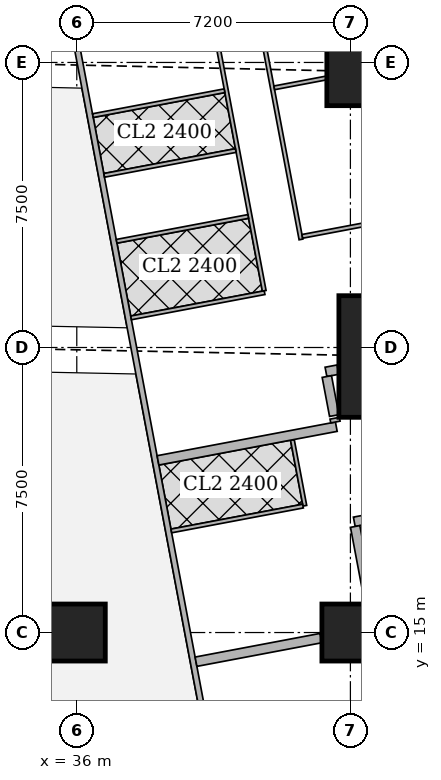
"""IFC4 building model, lengths in metres.
Left out: names, types, materials, properties, quantities, classifications, styles, units other than length and angle.
Written with IfcOpenShell. Run it as: python <this file> out.ifc"""

import sys

from ifc_helpers import new_model, si_unit, direction, frame, frame_2d, origin, origin_2d, place, context, subcontext, project, spatial, rectangle, extrude, element, fill, save


model = new_model("IFC4")
c1 = context("Model", 3, precision=1e-05, world=origin(), true_north=direction((0.0, 1.0)))
c2 = subcontext(c1, "Body", "Model", "MODEL_VIEW")
j1 = project(units=[si_unit("LENGTHUNIT", "METRE"), si_unit("PLANEANGLEUNIT", "RADIAN")], contexts=[c1])
p1 = place(None, origin())
s1 = spatial("IfcSite", under=j1, at=p1, CompositionType="ELEMENT")
p2 = place(p1, origin())
s2 = spatial("IfcBuilding", under=s1, at=p2, CompositionType="ELEMENT")
p3 = place(p2, frame((0.0, 0.0, 158.3)))
s3 = spatial("IfcBuildingStorey", under=s2, at=p3, CompositionType="ELEMENT", Elevation=158.3)
for number, where, z_axis, x_axis in (
    (1, (36.0, 15.0, 0.0), (0.0, 0.0, 1.0), (1.0, 0.0, 0.0)),
    (2, (43.2, 15.0, 0.0), (0.0, 0.0, 1.0), (1.0, 0.0, 0.0)),
):
    element("IfcColumn", number, at=place(p3, frame(where, z_axis=z_axis, x_axis=x_axis)), inside=s3, PredefinedType="COLUMN", context=c2, shape_type="SweptSolid", body=[
        extrude(rectangle(XDim=1.5, YDim=1.5, at=origin_2d()), origin(), (0.0, 0.0, 1.0), 3.75),
    ])
p4 = place(p3, frame((44.697, 22.263, 0.0), z_axis=(0.0, 0.0, 1.0), x_axis=(1.0, 0.0, 0.0)))
e3 = element("IfcColumn", 3, at=p4, inside=s3, PredefinedType="COLUMN", context=c2, shape_type="SweptSolid", body=[
    extrude(rectangle(XDim=3.6, YDim=3.2, at=origin_2d()), origin(), (0.0, 0.0, 1.0), 3.75),
])
p5 = place(p3, frame((43.48, 29.763, 0.0), z_axis=(0.0, 0.0, 1.0), x_axis=(1.0, 0.0, 0.0)))
e4 = element("IfcColumn", 4, at=p5, inside=s3, PredefinedType="COLUMN", context=c2, shape_type="SweptSolid", body=[
    extrude(rectangle(XDim=1.8, YDim=1.8, at=origin_2d()), origin(), (0.0, 0.0, 1.0), 3.75),
])
p6 = place(p3, frame((50.653, 2.703, 0.0), z_axis=(0.0, 0.0, 1.0), x_axis=(-0.185612026696, 0.982623109613, 0.0)))
e5 = element("IfcWall", 5, at=p6, inside=s3, PredefinedType="SOLIDWALL", context=c2, shape_type="SweptSolid", body=[
    extrude(rectangle(XDim=41.393, YDim=0.2, at=frame_2d((20.697, 0.0))), origin(), (0.0, 0.0, 1.0), 3.5),
])
p7 = place(p6, frame((1.633, 0.0, 0.9)))
e6 = element("IfcOpeningElement", 6, at=p7, cuts=e5, PredefinedType="OPENING", context=c2, shape_type="SweptSolid", body=[
    extrude(rectangle(XDim=1.8, YDim=1.5, at=frame_2d((0.9, 0.75))), frame((0.0, 0.11, 0.0), z_axis=(0.0, -1.0, 0.0), x_axis=(1.0, 0.0, 0.0)), (0.0, 0.0, 1.0), 0.22),
])
p8 = place(p6, frame((6.032, 0.0, 0.9)))
e7 = element("IfcOpeningElement", 7, at=p8, cuts=e5, PredefinedType="OPENING", context=c2, shape_type="SweptSolid", body=[
    extrude(rectangle(XDim=1.8, YDim=1.5, at=frame_2d((0.9, 0.75))), frame((0.0, 0.11, 0.0), z_axis=(0.0, -1.0, 0.0), x_axis=(1.0, 0.0, 0.0)), (0.0, 0.0, 1.0), 0.22),
])
p9 = place(p6, frame((9.848, 0.0, 0.9)))
e8 = element("IfcOpeningElement", 8, at=p9, cuts=e5, PredefinedType="OPENING", context=c2, shape_type="SweptSolid", body=[
    extrude(rectangle(XDim=1.8, YDim=1.5, at=frame_2d((0.9, 0.75))), frame((0.0, 0.11, 0.0), z_axis=(0.0, -1.0, 0.0), x_axis=(1.0, 0.0, 0.0)), (0.0, 0.0, 1.0), 0.22),
])
p10 = place(p6, frame((13.664, 0.0, 0.9)))
e9 = element("IfcOpeningElement", 9, at=p10, cuts=e5, PredefinedType="OPENING", context=c2, shape_type="SweptSolid", body=[
    extrude(rectangle(XDim=1.8, YDim=1.5, at=frame_2d((0.9, 0.75))), frame((0.0, 0.11, 0.0), z_axis=(0.0, -1.0, 0.0), x_axis=(1.0, 0.0, 0.0)), (0.0, 0.0, 1.0), 0.22),
])
p11 = place(p6, frame((17.481, 0.0, 0.9)))
e10 = element("IfcOpeningElement", 10, at=p11, cuts=e5, PredefinedType="OPENING", context=c2, shape_type="SweptSolid", body=[
    extrude(rectangle(XDim=1.8, YDim=1.5, at=frame_2d((0.9, 0.75))), frame((0.0, 0.11, 0.0), z_axis=(0.0, -1.0, 0.0), x_axis=(1.0, 0.0, 0.0)), (0.0, 0.0, 1.0), 0.22),
])
p12 = place(p6, frame((21.297, 0.0, 0.9)))
e11 = element("IfcOpeningElement", 11, at=p12, cuts=e5, PredefinedType="OPENING", context=c2, shape_type="SweptSolid", body=[
    extrude(rectangle(XDim=1.8, YDim=1.5, at=frame_2d((0.9, 0.75))), frame((0.0, 0.11, 0.0), z_axis=(0.0, -1.0, 0.0), x_axis=(1.0, 0.0, 0.0)), (0.0, 0.0, 1.0), 0.22),
])
p13 = place(p6, frame((25.113, 0.0, 0.9)))
e12 = element("IfcOpeningElement", 12, at=p13, cuts=e5, PredefinedType="OPENING", context=c2, shape_type="SweptSolid", body=[
    extrude(rectangle(XDim=1.8, YDim=1.5, at=frame_2d((0.9, 0.75))), frame((0.0, 0.11, 0.0), z_axis=(0.0, -1.0, 0.0), x_axis=(1.0, 0.0, 0.0)), (0.0, 0.0, 1.0), 0.22),
])
p14 = place(p6, frame((28.93, 0.0, 0.9)))
e13 = element("IfcOpeningElement", 13, at=p14, cuts=e5, PredefinedType="OPENING", context=c2, shape_type="SweptSolid", body=[
    extrude(rectangle(XDim=1.8, YDim=1.5, at=frame_2d((0.9, 0.75))), frame((0.0, 0.11, 0.0), z_axis=(0.0, -1.0, 0.0), x_axis=(1.0, 0.0, 0.0)), (0.0, 0.0, 1.0), 0.22),
])
p15 = place(p6, frame((32.746, 0.0, 0.9)))
e14 = element("IfcOpeningElement", 14, at=p15, cuts=e5, PredefinedType="OPENING", context=c2, shape_type="SweptSolid", body=[
    extrude(rectangle(XDim=1.8, YDim=1.5, at=frame_2d((0.9, 0.75))), frame((0.0, 0.11, 0.0), z_axis=(0.0, -1.0, 0.0), x_axis=(1.0, 0.0, 0.0)), (0.0, 0.0, 1.0), 0.22),
])
p16 = place(p6, frame((36.481, 0.0, 0.9)))
e15 = element("IfcOpeningElement", 15, at=p16, cuts=e5, PredefinedType="OPENING", context=c2, shape_type="SweptSolid", body=[
    extrude(rectangle(XDim=1.8, YDim=1.5, at=frame_2d((0.9, 0.75))), frame((0.0, 0.11, 0.0), z_axis=(0.0, -1.0, 0.0), x_axis=(1.0, 0.0, 0.0)), (0.0, 0.0, 1.0), 0.22),
])
p17 = place(p3, frame((33.623, 43.022, 0.0), z_axis=(0.0, 0.0, 1.0), x_axis=(0.185596841028, -0.98262597798, 0.0)))
e16 = element("IfcWall", 16, at=p17, inside=s3, PredefinedType="SOLIDWALL", context=c2, shape_type="SweptSolid", body=[
    extrude(rectangle(XDim=41.66, YDim=0.15, at=frame_2d((20.83, 0.0))), origin(), (0.0, 0.0, 1.0), 2.5),
])
p18 = place(p17, frame((21.514, 0.0, 0.0)))
e17 = element("IfcOpeningElement", 17, at=p18, cuts=e16, PredefinedType="OPENING", context=c2, shape_type="SweptSolid", body=[
    extrude(rectangle(XDim=1.0, YDim=2.1, at=frame_2d((0.5, 1.05))), frame((0.0, 0.085, 0.0), z_axis=(0.0, -1.0, 0.0), x_axis=(1.0, 0.0, 0.0)), (0.0, 0.0, 1.0), 0.17),
])
p19 = place(p17, frame((27.062, 0.0, 0.0)))
e18 = element("IfcOpeningElement", 18, at=p19, cuts=e16, PredefinedType="OPENING", context=c2, shape_type="SweptSolid", body=[
    extrude(rectangle(XDim=1.0, YDim=2.1, at=frame_2d((0.5, 1.05))), frame((0.0, 0.085, 0.0), z_axis=(0.0, -1.0, 0.0), x_axis=(1.0, 0.0, 0.0)), (0.0, 0.0, 1.0), 0.17),
])
p20 = place(p17, frame((29.934, 0.0, 0.0)))
e19 = element("IfcOpeningElement", 19, at=p20, cuts=e16, PredefinedType="OPENING", context=c2, shape_type="SweptSolid", body=[
    extrude(rectangle(XDim=1.0, YDim=2.1, at=frame_2d((0.5, 1.05))), frame((0.0, 0.085, 0.0), z_axis=(0.0, -1.0, 0.0), x_axis=(1.0, 0.0, 0.0)), (0.0, 0.0, 1.0), 0.17),
])
p21 = place(p3, frame((38.701, 42.27, 0.0), z_axis=(0.0, 0.0, 1.0), x_axis=(0.185644634212, -0.982616949675, 0.0)))
e20 = element("IfcWall", 20, at=p21, inside=s3, PredefinedType="PARTITIONING", context=c2, shape_type="SweptSolid", body=[
    extrude(rectangle(XDim=17.227, YDim=0.1, at=frame_2d((8.613, 0.0))), origin(), (0.0, 0.0, 1.0), 2.5),
])
p22 = place(p21, frame((16.054, 0.0, 0.0)))
e21 = element("IfcOpeningElement", 21, at=p22, cuts=e20, PredefinedType="OPENING", context=c2, shape_type="SweptSolid", body=[
    extrude(rectangle(XDim=0.9, YDim=2.1, at=frame_2d((0.45, 1.05))), frame((0.0, 0.06, 0.0), z_axis=(0.0, -1.0, 0.0), x_axis=(1.0, 0.0, 0.0)), (0.0, 0.0, 1.0), 0.12),
])
p23 = place(p21, frame((12.077, 0.0, 0.0)))
e22 = element("IfcOpeningElement", 22, at=p23, cuts=e20, PredefinedType="OPENING", context=c2, shape_type="SweptSolid", body=[
    extrude(rectangle(XDim=0.9, YDim=2.1, at=frame_2d((0.45, 1.05))), frame((0.0, 0.06, 0.0), z_axis=(0.0, -1.0, 0.0), x_axis=(1.0, 0.0, 0.0)), (0.0, 0.0, 1.0), 0.12),
])
p24 = place(p21, frame((8.42, 0.0, 0.0)))
e23 = element("IfcOpeningElement", 23, at=p24, cuts=e20, PredefinedType="OPENING", context=c2, shape_type="SweptSolid", body=[
    extrude(rectangle(XDim=0.9, YDim=2.1, at=frame_2d((0.45, 1.05))), frame((0.0, 0.06, 0.0), z_axis=(0.0, -1.0, 0.0), x_axis=(1.0, 0.0, 0.0)), (0.0, 0.0, 1.0), 0.12),
])
p25 = place(p21, frame((4.444, 0.0, 0.0)))
e24 = element("IfcOpeningElement", 24, at=p25, cuts=e20, PredefinedType="OPENING", context=c2, shape_type="SweptSolid", body=[
    extrude(rectangle(XDim=0.9, YDim=2.1, at=frame_2d((0.45, 1.05))), frame((0.0, 0.06, 0.0), z_axis=(0.0, -1.0, 0.0), x_axis=(1.0, 0.0, 0.0)), (0.0, 0.0, 1.0), 0.12),
])
p26 = place(p3, frame((37.411, 42.638, 0.0), z_axis=(0.0, 0.0, 1.0), x_axis=(0.185554598549, -0.982633955732, 0.0)))
e25 = element("IfcWall", 25, at=p26, inside=s3, PredefinedType="PARTITIONING", context=c2, shape_type="SweptSolid", body=[
    extrude(rectangle(XDim=18.976, YDim=0.1, at=frame_2d((9.488, 0.0))), origin(), (0.0, 0.0, 1.0), 2.5),
])
p27 = place(p26, frame((17.551, 0.0, 0.0)))
e26 = element("IfcOpeningElement", 26, at=p27, cuts=e25, PredefinedType="OPENING", context=c2, shape_type="SweptSolid", body=[
    extrude(rectangle(XDim=0.9, YDim=2.1, at=frame_2d((0.45, 1.05))), frame((0.0, 0.06, 0.0), z_axis=(0.0, -1.0, 0.0), x_axis=(1.0, 0.0, 0.0)), (0.0, 0.0, 1.0), 0.12),
])
p28 = place(p26, frame((13.959, 0.0, 0.0)))
e27 = element("IfcOpeningElement", 27, at=p28, cuts=e25, PredefinedType="OPENING", context=c2, shape_type="SweptSolid", body=[
    extrude(rectangle(XDim=0.9, YDim=2.1, at=frame_2d((0.45, 1.05))), frame((0.0, 0.06, 0.0), z_axis=(0.0, -1.0, 0.0), x_axis=(1.0, 0.0, 0.0)), (0.0, 0.0, 1.0), 0.12),
])
p29 = place(p26, frame((10.092, 0.0, 0.0)))
e28 = element("IfcOpeningElement", 28, at=p29, cuts=e25, PredefinedType="OPENING", context=c2, shape_type="SweptSolid", body=[
    extrude(rectangle(XDim=0.9, YDim=2.1, at=frame_2d((0.45, 1.05))), frame((0.0, 0.06, 0.0), z_axis=(0.0, -1.0, 0.0), x_axis=(1.0, 0.0, 0.0)), (0.0, 0.0, 1.0), 0.12),
])
p30 = place(p26, frame((5.731, 0.0, 0.0)))
e29 = element("IfcOpeningElement", 29, at=p30, cuts=e25, PredefinedType="OPENING", context=c2, shape_type="SweptSolid", body=[
    extrude(rectangle(XDim=0.9, YDim=2.1, at=frame_2d((0.45, 1.05))), frame((0.0, 0.06, 0.0), z_axis=(0.0, -1.0, 0.0), x_axis=(1.0, 0.0, 0.0)), (0.0, 0.0, 1.0), 0.12),
])
p31 = place(p26, frame((3.188, 0.0, 0.0)))
e30 = element("IfcOpeningElement", 30, at=p31, cuts=e25, PredefinedType="OPENING", context=c2, shape_type="SweptSolid", body=[
    extrude(rectangle(XDim=0.9, YDim=2.1, at=frame_2d((0.45, 1.05))), frame((0.0, 0.06, 0.0), z_axis=(0.0, -1.0, 0.0), x_axis=(1.0, 0.0, 0.0)), (0.0, 0.0, 1.0), 0.12),
])
p32 = place(p26, frame((0.15, 0.0, 0.0)))
e31 = element("IfcOpeningElement", 31, at=p32, cuts=e25, PredefinedType="OPENING", context=c2, shape_type="SweptSolid", body=[
    extrude(rectangle(XDim=0.9, YDim=2.1, at=frame_2d((0.45, 1.05))), frame((0.0, 0.06, 0.0), z_axis=(0.0, -1.0, 0.0), x_axis=(1.0, 0.0, 0.0)), (0.0, 0.0, 1.0), 0.12),
])
p33 = place(p26, frame((15.642, 0.0, 0.0)))
e32 = element("IfcOpeningElement", 32, at=p33, cuts=e25, PredefinedType="OPENING", context=c2, shape_type="SweptSolid", body=[
    extrude(rectangle(XDim=0.9, YDim=2.1, at=frame_2d((0.45, 1.05))), frame((0.0, 0.06, 0.0), z_axis=(0.0, -1.0, 0.0), x_axis=(1.0, 0.0, 0.0)), (0.0, 0.0, 1.0), 0.12),
])
p34 = place(p26, frame((12.051, 0.0, 0.0)))
e33 = element("IfcOpeningElement", 33, at=p34, cuts=e25, PredefinedType="OPENING", context=c2, shape_type="SweptSolid", body=[
    extrude(rectangle(XDim=0.9, YDim=2.1, at=frame_2d((0.45, 1.05))), frame((0.0, 0.06, 0.0), z_axis=(0.0, -1.0, 0.0), x_axis=(1.0, 0.0, 0.0)), (0.0, 0.0, 1.0), 0.12),
])
p35 = place(p26, frame((8.185, 0.0, 0.0)))
e34 = element("IfcOpeningElement", 34, at=p35, cuts=e25, PredefinedType="OPENING", context=c2, shape_type="SweptSolid", body=[
    extrude(rectangle(XDim=0.9, YDim=2.1, at=frame_2d((0.45, 1.05))), frame((0.0, 0.06, 0.0), z_axis=(0.0, -1.0, 0.0), x_axis=(1.0, 0.0, 0.0)), (0.0, 0.0, 1.0), 0.12),
])
p36 = place(p3, frame((42.57, 29.592, 0.0), z_axis=(0.0, 0.0, 1.0), x_axis=(-0.982562488259, -0.185932667021, 0.0)))
e35 = element("IfcWall", 35, at=p36, inside=s3, PredefinedType="PARTITIONING", context=c2, shape_type="SweptSolid", body=[
    extrude(rectangle(XDim=1.398, YDim=0.1, at=frame_2d((0.699, 0.0))), origin(), (0.0, 0.0, 1.0), 2.5),
])
p37 = place(p3, frame((46.11, 26.213, 0.0), z_axis=(0.0, 0.0, 1.0), x_axis=(-0.982623519589, -0.185609856287, 0.0)))
e36 = element("IfcWall", 36, at=p37, inside=s3, PredefinedType="PARTITIONING", context=c2, shape_type="SweptSolid", body=[
    extrude(rectangle(XDim=4.25, YDim=0.1, at=frame_2d((2.125, 0.0))), origin(), (0.0, 0.0, 1.0), 2.1),
])
p38 = place(p3, frame((40.184, 27.683, 0.0), z_axis=(0.0, 0.0, 1.0), x_axis=(-0.982638553676, -0.185530247748, 0.0)))
e37 = element("IfcWall", 37, at=p38, inside=s3, PredefinedType="PARTITIONING", context=c2, shape_type="SweptSolid", body=[
    extrude(rectangle(XDim=3.525, YDim=0.1, at=frame_2d((1.763, 0.0))), origin(), (0.0, 0.0, 1.0), 3.5),
])
p39 = place(p3, frame((40.942, 23.943, 0.0), z_axis=(0.0, 0.0, 1.0), x_axis=(-0.982598214409, -0.185743772548, 0.0)))
e38 = element("IfcWall", 38, at=p39, inside=s3, PredefinedType="PARTITIONING", context=c2, shape_type="SweptSolid", body=[
    extrude(rectangle(XDim=3.575, YDim=0.1, at=frame_2d((1.788, 0.0))), origin(), (0.0, 0.0, 1.0), 3.5),
])
p40 = place(p3, frame((40.512, 25.948, 0.0), z_axis=(0.0, 0.0, 1.0), x_axis=(-0.982636169624, -0.185542874149, 0.0)))
e39 = element("IfcWall", 39, at=p40, inside=s3, PredefinedType="PARTITIONING", context=c2, shape_type="SweptSolid", body=[
    extrude(rectangle(XDim=3.525, YDim=0.1, at=frame_2d((1.763, 0.0))), origin(), (0.0, 0.0, 1.0), 3.5),
])
p41 = place(p3, frame((39.887, 29.256, 0.0), z_axis=(0.0, 0.0, 1.0), x_axis=(-0.982585626838, -0.185810349366, 0.0)))
e40 = element("IfcWall", 40, at=p41, inside=s3, PredefinedType="PARTITIONING", context=c2, shape_type="SweptSolid", body=[
    extrude(rectangle(XDim=3.525, YDim=0.1, at=frame_2d((1.763, 0.0))), origin(), (0.0, 0.0, 1.0), 2.5),
])
p42 = place(p3, frame((41.673, 20.07, 0.0), z_axis=(0.0, 0.0, 1.0), x_axis=(0.185783379659, -0.98259072652, 0.0)))
e41 = element("IfcWall", 41, at=p42, inside=s3, PredefinedType="PARTITIONING", context=c2, shape_type="SweptSolid", body=[
    extrude(rectangle(XDim=1.765, YDim=0.1, at=frame_2d((0.882, 0.0))), origin(), (0.0, 0.0, 1.0), 3.5),
])
p43 = place(p42, frame((0.374, 0.0, 0.0)))
e42 = element("IfcOpeningElement", 42, at=p43, cuts=e41, PredefinedType="OPENING", context=c2, shape_type="SweptSolid", body=[
    extrude(rectangle(XDim=0.9, YDim=2.1, at=frame_2d((0.45, 1.05))), frame((0.0, 0.06, 0.0), z_axis=(0.0, -1.0, 0.0), x_axis=(1.0, 0.0, 0.0)), (0.0, 0.0, 1.0), 0.12),
])
p44 = place(p3, frame((41.952, 18.327, 0.0), z_axis=(0.0, 0.0, 1.0), x_axis=(-0.982648794755, -0.185475998897, 0.0)))
e43 = element("IfcWall", 43, at=p44, inside=s3, PredefinedType="PARTITIONING", context=c2, shape_type="SweptSolid", body=[
    extrude(rectangle(XDim=3.525, YDim=0.1, at=frame_2d((1.763, 0.0))), origin(), (0.0, 0.0, 1.0), 3.5),
])
p45 = place(p3, frame((42.873, 21.918, 0.0), z_axis=(0.0, 0.0, 1.0), x_axis=(-0.982431406936, -0.186624035603, 0.0)))
e44 = element("IfcWall", 44, at=p45, inside=s3, PredefinedType="SOLIDWALL", context=c2, shape_type="SweptSolid", body=[
    extrude(rectangle(XDim=0.322, YDim=0.25, at=frame_2d((0.161, 0.0))), origin(), (0.0, 0.0, 1.0), 2.5),
])
p46 = place(p3, frame((42.829, 20.416, 0.0), z_axis=(0.0, 0.0, 1.0), x_axis=(-0.982635807605, -0.185544791394, 0.0)))
e45 = element("IfcWall", 45, at=p46, inside=s3, PredefinedType="SOLIDWALL", context=c2, shape_type="SweptSolid", body=[
    extrude(rectangle(XDim=4.775, YDim=0.25, at=frame_2d((2.388, 0.0))), origin(), (0.0, 0.0, 1.0), 3.5),
])
p47 = place(p3, frame((42.58, 21.736, 0.0), z_axis=(0.0, 0.0, 1.0), x_axis=(0.185458925981, -0.982652017132, 0.0)))
e46 = element("IfcWall", 46, at=p47, inside=s3, PredefinedType="SOLIDWALL", context=c2, shape_type="SweptSolid", body=[
    extrude(rectangle(XDim=1.045, YDim=0.25, at=frame_2d((0.522, 0.0))), origin(), (0.0, 0.0, 1.0), 2.5),
])
p48 = place(p3, frame((42.787, 20.639, 0.0), z_axis=(0.0, 0.0, 1.0), x_axis=(0.185013851593, -0.982735913009, 0.0)))
e47 = element("IfcWall", 47, at=p48, inside=s3, PredefinedType="SOLIDWALL", context=c2, shape_type="SweptSolid", body=[
    extrude(rectangle(XDim=0.102, YDim=0.25, at=frame_2d((0.051, 0.0))), origin(), (0.0, 0.0, 1.0), 3.5),
])
p49 = place(p3, frame((47.527, 18.712, 0.0), z_axis=(0.0, 0.0, 1.0), x_axis=(-0.982633535512, -0.185556823879, 0.0)))
e48 = element("IfcWall", 48, at=p49, inside=s3, PredefinedType="SOLIDWALL", context=c2, shape_type="SweptSolid", body=[
    extrude(rectangle(XDim=4.3, YDim=0.25, at=frame_2d((2.15, 0.0))), origin(), (0.0, 0.0, 1.0), 2.1),
])
p50 = place(p3, frame((42.426, 14.854, 0.0), z_axis=(0.0, 0.0, 1.0), x_axis=(-0.982580325536, -0.185838381047, 0.0)))
e49 = element("IfcWall", 49, at=p50, inside=s3, PredefinedType="SOLIDWALL", context=c2, shape_type="SweptSolid", body=[
    extrude(rectangle(XDim=3.347, YDim=0.25, at=frame_2d((1.674, 0.0))), origin(), (0.0, 0.0, 1.0), 3.5),
])
p51 = place(p3, frame((43.325, 17.791, 0.0), z_axis=(0.0, 0.0, 1.0), x_axis=(0.185652708443, -0.982615424186, 0.0)))
e50 = element("IfcWall", 50, at=p51, inside=s3, PredefinedType="SOLIDWALL", context=c2, shape_type="SweptSolid", body=[
    extrude(rectangle(XDim=2.053, YDim=0.25, at=frame_2d((1.026, 0.0))), origin(), (0.0, 0.0, 1.0), 3.5),
])
p52 = place(p3, frame((35.354, 10.424, 0.0), z_axis=(0.0, 0.0, 1.0), x_axis=(-0.185612234763, 0.982623070311, 0.0)))
e51 = element("IfcWall", 51, at=p52, inside=s3, PredefinedType="PARTITIONING", context=c2, shape_type="SweptSolid", body=[
    extrude(rectangle(XDim=11.513, YDim=0.125, at=frame_2d((5.756, 0.0))), origin(), (0.0, 0.0, 1.0), 3.5),
])
p53 = place(p52, frame((0.697, 0.0, 0.0)))
e52 = element("IfcOpeningElement", 52, at=p53, cuts=e51, PredefinedType="OPENING", context=c2, shape_type="SweptSolid", body=[
    extrude(rectangle(XDim=1.0, YDim=2.1, at=frame_2d((0.5, 1.05))), frame((0.0, 0.073, 0.0), z_axis=(0.0, -1.0, 0.0), x_axis=(1.0, 0.0, 0.0)), (0.0, 0.0, 1.0), 0.145),
])
p54 = place(p52, frame((5.48, 0.0, 0.0)))
e53 = element("IfcOpeningElement", 53, at=p54, cuts=e51, PredefinedType="OPENING", context=c2, shape_type="SweptSolid", body=[
    extrude(rectangle(XDim=1.0, YDim=2.1, at=frame_2d((0.5, 1.05))), frame((0.0, 0.073, 0.0), z_axis=(0.0, -1.0, 0.0), x_axis=(1.0, 0.0, 0.0)), (0.0, 0.0, 1.0), 0.145),
])
p55 = place(p22, origin())
e54 = element("IfcDoor", 54, at=p55, inside=s3, OperationType="SINGLE_SWING_RIGHT", PredefinedType="DOOR", context=c2, shape_type="SweptSolid", body=[
    extrude(rectangle(XDim=0.9, YDim=2.1, at=frame_2d((0.45, 1.05))), frame((0.0, 0.025, 0.0), z_axis=(0.0, -1.0, 0.0), x_axis=(1.0, 0.0, 0.0)), (0.0, 0.0, 1.0), 0.05),
])
fill(e21, e54)
p56 = place(p23, origin())
e55 = element("IfcDoor", 55, at=p56, inside=s3, OperationType="SINGLE_SWING_RIGHT", PredefinedType="DOOR", context=c2, shape_type="SweptSolid", body=[
    extrude(rectangle(XDim=0.9, YDim=2.1, at=frame_2d((0.45, 1.05))), frame((0.0, 0.025, 0.0), z_axis=(0.0, -1.0, 0.0), x_axis=(1.0, 0.0, 0.0)), (0.0, 0.0, 1.0), 0.05),
])
fill(e22, e55)
p57 = place(p27, origin())
e56 = element("IfcDoor", 56, at=p57, inside=s3, OperationType="SINGLE_SWING_LEFT", PredefinedType="DOOR", context=c2, shape_type="SweptSolid", body=[
    extrude(rectangle(XDim=0.9, YDim=2.1, at=frame_2d((0.45, 1.05))), frame((0.0, 0.025, 0.0), z_axis=(0.0, -1.0, 0.0), x_axis=(1.0, 0.0, 0.0)), (0.0, 0.0, 1.0), 0.05),
])
fill(e26, e56)
p58 = place(p28, origin())
e57 = element("IfcDoor", 57, at=p58, inside=s3, OperationType="SINGLE_SWING_LEFT", PredefinedType="DOOR", context=c2, shape_type="SweptSolid", body=[
    extrude(rectangle(XDim=0.9, YDim=2.1, at=frame_2d((0.45, 1.05))), frame((0.0, 0.025, 0.0), z_axis=(0.0, -1.0, 0.0), x_axis=(1.0, 0.0, 0.0)), (0.0, 0.0, 1.0), 0.05),
])
fill(e27, e57)
p59 = place(p33, origin())
e58 = element("IfcDoor", 58, at=p59, inside=s3, OperationType="SINGLE_SWING_RIGHT", PredefinedType="DOOR", context=c2, shape_type="SweptSolid", body=[
    extrude(rectangle(XDim=0.9, YDim=2.1, at=frame_2d((0.45, 1.05))), frame((0.0, 0.025, 0.0), z_axis=(0.0, -1.0, 0.0), x_axis=(1.0, 0.0, 0.0)), (0.0, 0.0, 1.0), 0.05),
])
fill(e32, e58)
p60 = place(p34, origin())
e59 = element("IfcDoor", 59, at=p60, inside=s3, OperationType="SINGLE_SWING_LEFT", PredefinedType="DOOR", context=c2, shape_type="SweptSolid", body=[
    extrude(rectangle(XDim=0.9, YDim=2.1, at=frame_2d((0.45, 1.05))), frame((0.0, 0.025, 0.0), z_axis=(0.0, -1.0, 0.0), x_axis=(1.0, 0.0, 0.0)), (0.0, 0.0, 1.0), 0.05),
])
fill(e33, e59)
p61 = place(p18, origin())
e60 = element("IfcDoor", 60, at=p61, inside=s3, OperationType="SINGLE_SWING_RIGHT", PredefinedType="DOOR", context=c2, shape_type="SweptSolid", body=[
    extrude(rectangle(XDim=1.0, YDim=2.1, at=frame_2d((0.5, 1.05))), frame((0.0, 0.025, 0.0), z_axis=(0.0, -1.0, 0.0), x_axis=(1.0, 0.0, 0.0)), (0.0, 0.0, 1.0), 0.05),
])
fill(e17, e60)
p62 = place(p43, origin())
e61 = element("IfcDoor", 61, at=p62, inside=s3, OperationType="SINGLE_SWING_RIGHT", PredefinedType="DOOR", context=c2, shape_type="SweptSolid", body=[
    extrude(rectangle(XDim=0.9, YDim=2.1, at=frame_2d((0.45, 1.05))), frame((0.0, 0.025, 0.0), z_axis=(0.0, -1.0, 0.0), x_axis=(1.0, 0.0, 0.0)), (0.0, 0.0, 1.0), 0.05),
])
fill(e42, e61)
p63 = place(p19, origin())
e62 = element("IfcDoor", 62, at=p63, inside=s3, OperationType="SINGLE_SWING_LEFT", PredefinedType="DOOR", context=c2, shape_type="SweptSolid", body=[
    extrude(rectangle(XDim=1.0, YDim=2.1, at=frame_2d((0.5, 1.05))), frame((0.0, 0.025, 0.0), z_axis=(0.0, -1.0, 0.0), x_axis=(1.0, 0.0, 0.0)), (0.0, 0.0, 1.0), 0.05),
])
fill(e18, e62)
p64 = place(p20, origin())
e63 = element("IfcDoor", 63, at=p64, inside=s3, OperationType="SINGLE_SWING_RIGHT", PredefinedType="DOOR", context=c2, shape_type="SweptSolid", body=[
    extrude(rectangle(XDim=1.0, YDim=2.1, at=frame_2d((0.5, 1.05))), frame((0.0, 0.025, 0.0), z_axis=(0.0, -1.0, 0.0), x_axis=(1.0, 0.0, 0.0)), (0.0, 0.0, 1.0), 0.05),
])
fill(e19, e63)
save(model, sys.argv[1])
